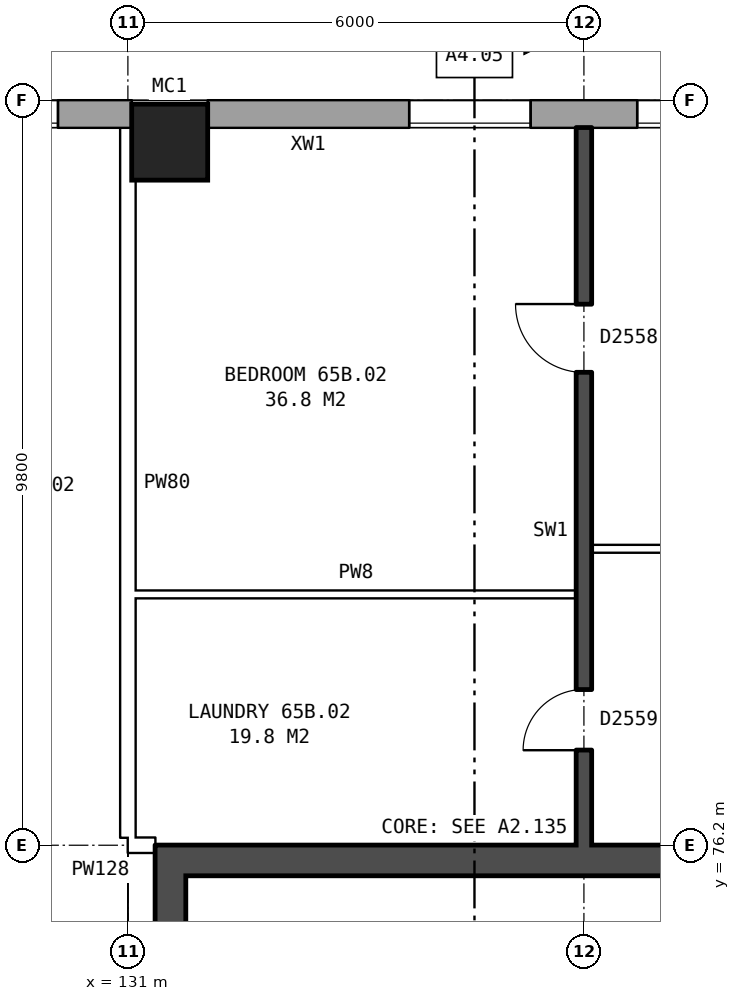
"""IFC4 building model, lengths in metres.
Left out: names, types, materials, properties, quantities, classifications, styles, units other than length and angle.
Written with IfcOpenShell. Run it as: python <this file> out.ifc"""

import sys

from ifc_helpers import new_model, si_unit, direction, frame, frame_2d, origin, origin_2d, place, context, subcontext, project, spatial, rectangle, hollow_rectangle, extrude, element, fill, save


model = new_model("IFC4")
c1 = context("Model", 3, precision=1e-05, world=origin(), true_north=direction((0.0, 1.0)))
c2 = subcontext(c1, "Body", "Model", "MODEL_VIEW")
j1 = project(units=[si_unit("LENGTHUNIT", "METRE"), si_unit("PLANEANGLEUNIT", "RADIAN")], contexts=[c1])
p1 = place(None, origin())
s1 = spatial("IfcSite", under=j1, at=p1, CompositionType="ELEMENT")
p2 = place(p1, origin())
s2 = spatial("IfcBuilding", under=s1, at=p2, CompositionType="ELEMENT")
p3 = place(p2, frame((0.0, 0.0, 230.7)))
s3 = spatial("IfcBuildingStorey", under=s2, at=p3, CompositionType="ELEMENT", Elevation=230.7)
p4 = place(p3, frame((131.55, 85.45, 0.0), z_axis=(0.0, 0.0, 1.0), x_axis=(1.0, 0.0, 0.0)))
e1 = element("IfcColumn", 1, at=p4, inside=s3, PredefinedType="COLUMN", context=c2, shape_type="SweptSolid", body=[
    extrude(hollow_rectangle(XDim=1.0, YDim=1.0, WallThickness=0.055, at=origin_2d()), origin(), (0.0, 0.0, 1.0), 3.1),
])
p5 = place(p3, frame((165.925, 85.82, 0.0), z_axis=(0.0, 0.0, 1.0), x_axis=(-1.0, 0.0, 0.0)))
e2 = element("IfcWall", 2, at=p5, inside=s3, PredefinedType="STANDARD", context=c2, shape_type="SweptSolid", body=[
    extrude(rectangle(XDim=33.875, YDim=0.36, at=frame_2d((16.938, 0.0))), origin(), (0.0, 0.0, 1.0), 2.85),
])
p6 = place(p5, frame((2.625, 0.0, 0.8)))
e3 = element("IfcOpeningElement", 3, at=p6, cuts=e2, PredefinedType="OPENING", context=c2, shape_type="SweptSolid", body=[
    extrude(rectangle(XDim=1.6, YDim=1.8, at=frame_2d((0.8, 0.9))), frame((0.0, 0.19, 0.0), z_axis=(0.0, -1.0, 0.0), x_axis=(1.0, 0.0, 0.0)), (0.0, 0.0, 1.0), 0.38),
])
p7 = place(p5, frame((5.625, 0.0, 0.8)))
e4 = element("IfcOpeningElement", 4, at=p7, cuts=e2, PredefinedType="OPENING", context=c2, shape_type="SweptSolid", body=[
    extrude(rectangle(XDim=1.6, YDim=1.8, at=frame_2d((0.8, 0.9))), frame((0.0, 0.19, 0.0), z_axis=(0.0, -1.0, 0.0), x_axis=(1.0, 0.0, 0.0)), (0.0, 0.0, 1.0), 0.38),
])
p8 = place(p5, frame((8.625, 0.0, 0.8)))
e5 = element("IfcOpeningElement", 5, at=p8, cuts=e2, PredefinedType="OPENING", context=c2, shape_type="SweptSolid", body=[
    extrude(rectangle(XDim=1.6, YDim=1.8, at=frame_2d((0.8, 0.9))), frame((0.0, 0.19, 0.0), z_axis=(0.0, -1.0, 0.0), x_axis=(1.0, 0.0, 0.0)), (0.0, 0.0, 1.0), 0.38),
])
p9 = place(p5, frame((11.125, 0.0, 0.8)))
e6 = element("IfcOpeningElement", 6, at=p9, cuts=e2, PredefinedType="OPENING", context=c2, shape_type="SweptSolid", body=[
    extrude(rectangle(XDim=1.4, YDim=1.8, at=frame_2d((0.7, 0.9))), frame((0.0, 0.19, 0.0), z_axis=(0.0, -1.0, 0.0), x_axis=(1.0, 0.0, 0.0)), (0.0, 0.0, 1.0), 0.38),
])
p10 = place(p5, frame((14.625, 0.0, 0.8)))
e7 = element("IfcOpeningElement", 7, at=p10, cuts=e2, PredefinedType="OPENING", context=c2, shape_type="SweptSolid", body=[
    extrude(rectangle(XDim=1.6, YDim=1.8, at=frame_2d((0.8, 0.9))), frame((0.0, 0.19, 0.0), z_axis=(0.0, -1.0, 0.0), x_axis=(1.0, 0.0, 0.0)), (0.0, 0.0, 1.0), 0.38),
])
p11 = place(p5, frame((17.125, 0.0, 0.25)))
e8 = element("IfcOpeningElement", 8, at=p11, cuts=e2, PredefinedType="OPENING", context=c2, shape_type="SweptSolid", body=[
    extrude(rectangle(XDim=0.6, YDim=1.2, at=frame_2d((0.3, 0.6))), frame((0.0, 0.19, 0.0), z_axis=(0.0, -1.0, 0.0), x_axis=(1.0, 0.0, 0.0)), (0.0, 0.0, 1.0), 0.38),
])
p12 = place(p5, frame((20.625, 0.0, 0.8)))
e9 = element("IfcOpeningElement", 9, at=p12, cuts=e2, PredefinedType="OPENING", context=c2, shape_type="SweptSolid", body=[
    extrude(rectangle(XDim=1.6, YDim=1.8, at=frame_2d((0.8, 0.9))), frame((0.0, 0.19, 0.0), z_axis=(0.0, -1.0, 0.0), x_axis=(1.0, 0.0, 0.0)), (0.0, 0.0, 1.0), 0.38),
])
p13 = place(p5, frame((23.625, 0.0, 0.8)))
e10 = element("IfcOpeningElement", 10, at=p13, cuts=e2, PredefinedType="OPENING", context=c2, shape_type="SweptSolid", body=[
    extrude(rectangle(XDim=1.6, YDim=1.8, at=frame_2d((0.8, 0.9))), frame((0.0, 0.19, 0.0), z_axis=(0.0, -1.0, 0.0), x_axis=(1.0, 0.0, 0.0)), (0.0, 0.0, 1.0), 0.38),
])
p14 = place(p5, frame((26.625, 0.0, 0.8)))
e11 = element("IfcOpeningElement", 11, at=p14, cuts=e2, PredefinedType="OPENING", context=c2, shape_type="SweptSolid", body=[
    extrude(rectangle(XDim=1.6, YDim=1.8, at=frame_2d((0.8, 0.9))), frame((0.0, 0.19, 0.0), z_axis=(0.0, -1.0, 0.0), x_axis=(1.0, 0.0, 0.0)), (0.0, 0.0, 1.0), 0.38),
])
p15 = place(p5, frame((29.625, 0.0, 0.8)))
e12 = element("IfcOpeningElement", 12, at=p15, cuts=e2, PredefinedType="OPENING", context=c2, shape_type="SweptSolid", body=[
    extrude(rectangle(XDim=1.6, YDim=1.8, at=frame_2d((0.8, 0.9))), frame((0.0, 0.19, 0.0), z_axis=(0.0, -1.0, 0.0), x_axis=(1.0, 0.0, 0.0)), (0.0, 0.0, 1.0), 0.38),
])
p16 = place(p5, frame((18.925, 0.0, 1.35)))
e13 = element("IfcOpeningElement", 13, at=p16, cuts=e2, PredefinedType="OPENING", context=c2, shape_type="SweptSolid", body=[
    extrude(rectangle(XDim=0.8, YDim=1.2, at=frame_2d((0.4, 0.6))), frame((0.0, 0.19, 0.0), z_axis=(0.0, -1.0, 0.0), x_axis=(1.0, 0.0, 0.0)), (0.0, 0.0, 1.0), 0.38),
])
p17 = place(p3, frame((131.05, 85.82, 0.0), z_axis=(0.0, 0.0, 1.0), x_axis=(-1.0, 0.0, 0.0)))
e14 = element("IfcWall", 14, at=p17, inside=s3, PredefinedType="STANDARD", context=c2, shape_type="SweptSolid", body=[
    extrude(rectangle(XDim=55.1, YDim=0.36, at=frame_2d((27.55, 0.0))), origin(), (0.0, 0.0, 1.0), 2.85),
])
p18 = place(p17, frame((0.969, 0.0, 0.8)))
e15 = element("IfcOpeningElement", 15, at=p18, cuts=e14, PredefinedType="OPENING", context=c2, shape_type="SweptSolid", body=[
    extrude(rectangle(XDim=1.6, YDim=1.8, at=frame_2d((0.8, 0.9))), frame((0.0, 0.19, 0.0), z_axis=(0.0, -1.0, 0.0), x_axis=(1.0, 0.0, 0.0)), (0.0, 0.0, 1.0), 0.38),
])
p19 = place(p17, frame((4.406, 0.0, 0.8)))
e16 = element("IfcOpeningElement", 16, at=p19, cuts=e14, PredefinedType="OPENING", context=c2, shape_type="SweptSolid", body=[
    extrude(rectangle(XDim=1.6, YDim=1.8, at=frame_2d((0.8, 0.9))), frame((0.0, 0.19, 0.0), z_axis=(0.0, -1.0, 0.0), x_axis=(1.0, 0.0, 0.0)), (0.0, 0.0, 1.0), 0.38),
])
p20 = place(p17, frame((7.844, 0.0, 0.8)))
e17 = element("IfcOpeningElement", 17, at=p20, cuts=e14, PredefinedType="OPENING", context=c2, shape_type="SweptSolid", body=[
    extrude(rectangle(XDim=1.6, YDim=1.8, at=frame_2d((0.8, 0.9))), frame((0.0, 0.19, 0.0), z_axis=(0.0, -1.0, 0.0), x_axis=(1.0, 0.0, 0.0)), (0.0, 0.0, 1.0), 0.38),
])
p21 = place(p17, frame((11.281, 0.0, 0.8)))
e18 = element("IfcOpeningElement", 18, at=p21, cuts=e14, PredefinedType="OPENING", context=c2, shape_type="SweptSolid", body=[
    extrude(rectangle(XDim=1.6, YDim=1.8, at=frame_2d((0.8, 0.9))), frame((0.0, 0.19, 0.0), z_axis=(0.0, -1.0, 0.0), x_axis=(1.0, 0.0, 0.0)), (0.0, 0.0, 1.0), 0.38),
])
p22 = place(p17, frame((14.719, 0.0, 0.8)))
e19 = element("IfcOpeningElement", 19, at=p22, cuts=e14, PredefinedType="OPENING", context=c2, shape_type="SweptSolid", body=[
    extrude(rectangle(XDim=1.6, YDim=1.8, at=frame_2d((0.8, 0.9))), frame((0.0, 0.19, 0.0), z_axis=(0.0, -1.0, 0.0), x_axis=(1.0, 0.0, 0.0)), (0.0, 0.0, 1.0), 0.38),
])
p23 = place(p17, frame((18.156, 0.0, 0.8)))
e20 = element("IfcOpeningElement", 20, at=p23, cuts=e14, PredefinedType="OPENING", context=c2, shape_type="SweptSolid", body=[
    extrude(rectangle(XDim=1.6, YDim=1.8, at=frame_2d((0.8, 0.9))), frame((0.0, 0.19, 0.0), z_axis=(0.0, -1.0, 0.0), x_axis=(1.0, 0.0, 0.0)), (0.0, 0.0, 1.0), 0.38),
])
p24 = place(p17, frame((21.594, 0.0, 0.8)))
e21 = element("IfcOpeningElement", 21, at=p24, cuts=e14, PredefinedType="OPENING", context=c2, shape_type="SweptSolid", body=[
    extrude(rectangle(XDim=1.6, YDim=1.8, at=frame_2d((0.8, 0.9))), frame((0.0, 0.19, 0.0), z_axis=(0.0, -1.0, 0.0), x_axis=(1.0, 0.0, 0.0)), (0.0, 0.0, 1.0), 0.38),
])
p25 = place(p17, frame((25.031, 0.0, 0.8)))
e22 = element("IfcOpeningElement", 22, at=p25, cuts=e14, PredefinedType="OPENING", context=c2, shape_type="SweptSolid", body=[
    extrude(rectangle(XDim=1.6, YDim=1.8, at=frame_2d((0.8, 0.9))), frame((0.0, 0.19, 0.0), z_axis=(0.0, -1.0, 0.0), x_axis=(1.0, 0.0, 0.0)), (0.0, 0.0, 1.0), 0.38),
])
p26 = place(p17, frame((28.469, 0.0, 0.8)))
e23 = element("IfcOpeningElement", 23, at=p26, cuts=e14, PredefinedType="OPENING", context=c2, shape_type="SweptSolid", body=[
    extrude(rectangle(XDim=1.6, YDim=1.8, at=frame_2d((0.8, 0.9))), frame((0.0, 0.19, 0.0), z_axis=(0.0, -1.0, 0.0), x_axis=(1.0, 0.0, 0.0)), (0.0, 0.0, 1.0), 0.38),
])
p27 = place(p17, frame((31.906, 0.0, 0.8)))
e24 = element("IfcOpeningElement", 24, at=p27, cuts=e14, PredefinedType="OPENING", context=c2, shape_type="SweptSolid", body=[
    extrude(rectangle(XDim=1.6, YDim=1.8, at=frame_2d((0.8, 0.9))), frame((0.0, 0.19, 0.0), z_axis=(0.0, -1.0, 0.0), x_axis=(1.0, 0.0, 0.0)), (0.0, 0.0, 1.0), 0.38),
])
p28 = place(p17, frame((35.344, 0.0, 0.8)))
e25 = element("IfcOpeningElement", 25, at=p28, cuts=e14, PredefinedType="OPENING", context=c2, shape_type="SweptSolid", body=[
    extrude(rectangle(XDim=1.6, YDim=1.8, at=frame_2d((0.8, 0.9))), frame((0.0, 0.19, 0.0), z_axis=(0.0, -1.0, 0.0), x_axis=(1.0, 0.0, 0.0)), (0.0, 0.0, 1.0), 0.38),
])
p29 = place(p17, frame((38.781, 0.0, 0.8)))
e26 = element("IfcOpeningElement", 26, at=p29, cuts=e14, PredefinedType="OPENING", context=c2, shape_type="SweptSolid", body=[
    extrude(rectangle(XDim=1.6, YDim=1.8, at=frame_2d((0.8, 0.9))), frame((0.0, 0.19, 0.0), z_axis=(0.0, -1.0, 0.0), x_axis=(1.0, 0.0, 0.0)), (0.0, 0.0, 1.0), 0.38),
])
p30 = place(p17, frame((42.219, 0.0, 0.8)))
e27 = element("IfcOpeningElement", 27, at=p30, cuts=e14, PredefinedType="OPENING", context=c2, shape_type="SweptSolid", body=[
    extrude(rectangle(XDim=1.6, YDim=1.8, at=frame_2d((0.8, 0.9))), frame((0.0, 0.19, 0.0), z_axis=(0.0, -1.0, 0.0), x_axis=(1.0, 0.0, 0.0)), (0.0, 0.0, 1.0), 0.38),
])
p31 = place(p17, frame((45.656, 0.0, 0.8)))
e28 = element("IfcOpeningElement", 28, at=p31, cuts=e14, PredefinedType="OPENING", context=c2, shape_type="SweptSolid", body=[
    extrude(rectangle(XDim=1.6, YDim=1.8, at=frame_2d((0.8, 0.9))), frame((0.0, 0.19, 0.0), z_axis=(0.0, -1.0, 0.0), x_axis=(1.0, 0.0, 0.0)), (0.0, 0.0, 1.0), 0.38),
])
p32 = place(p17, frame((49.094, 0.0, 0.8)))
e29 = element("IfcOpeningElement", 29, at=p32, cuts=e14, PredefinedType="OPENING", context=c2, shape_type="SweptSolid", body=[
    extrude(rectangle(XDim=1.6, YDim=1.8, at=frame_2d((0.8, 0.9))), frame((0.0, 0.19, 0.0), z_axis=(0.0, -1.0, 0.0), x_axis=(1.0, 0.0, 0.0)), (0.0, 0.0, 1.0), 0.38),
])
p33 = place(p17, frame((52.531, 0.0, 0.8)))
e30 = element("IfcOpeningElement", 30, at=p33, cuts=e14, PredefinedType="OPENING", context=c2, shape_type="SweptSolid", body=[
    extrude(rectangle(XDim=1.6, YDim=1.8, at=frame_2d((0.8, 0.9))), frame((0.0, 0.19, 0.0), z_axis=(0.0, -1.0, 0.0), x_axis=(1.0, 0.0, 0.0)), (0.0, 0.0, 1.0), 0.38),
])
p34 = place(p3, frame((131.56, 63.8, 0.0), z_axis=(0.0, 0.0, 1.0), x_axis=(0.0, 1.0, 0.0)))
e31 = element("IfcWall", 31, at=p34, inside=s3, PredefinedType="SHEAR", context=c2, shape_type="SweptSolid", body=[
    extrude(rectangle(XDim=12.4, YDim=0.4, at=frame_2d((6.2, 0.0))), origin(), (0.0, 0.0, 1.0), 2.85),
])
p35 = place(p34, frame((9.8, 0.0, 0.0)))
e32 = element("IfcOpeningElement", 32, at=p35, cuts=e31, PredefinedType="OPENING", context=c2, shape_type="SweptSolid", body=[
    extrude(rectangle(XDim=1.1, YDim=2.1, at=frame_2d((0.55, 1.05))), frame((0.0, 0.21, 0.0), z_axis=(0.0, -1.0, 0.0), x_axis=(1.0, 0.0, 0.0)), (0.0, 0.0, 1.0), 0.42),
])
p36 = place(p3, frame((139.36, 76.0, 0.0), z_axis=(0.0, 0.0, 1.0), x_axis=(-1.0, 0.0, 0.0)))
e33 = element("IfcWall", 33, at=p36, inside=s3, PredefinedType="SHEAR", context=c2, shape_type="SweptSolid", body=[
    extrude(rectangle(XDim=7.6, YDim=0.4, at=frame_2d((3.8, 0.0))), origin(), (0.0, 0.0, 1.0), 2.85),
])
p37 = place(p3, frame((131.0, 76.2, 0.0), z_axis=(0.0, 0.0, 1.0), x_axis=(1.0, 0.0, 0.0)))
e34 = element("IfcWall", 34, at=p37, inside=s3, PredefinedType="PARTITIONING", context=c2, shape_type="SweptSolid", body=[
    extrude(rectangle(XDim=0.36, YDim=0.2, at=frame_2d((0.18, 0.0))), origin(), (0.0, 0.0, 1.0), 2.85),
])
p38 = place(p3, frame((131.1, 79.5, 0.0), z_axis=(0.0, 0.0, 1.0), x_axis=(1.0, 0.0, 0.0)))
e35 = element("IfcWall", 35, at=p38, inside=s3, PredefinedType="PARTITIONING", context=c2, shape_type="SweptSolid", body=[
    extrude(rectangle(XDim=5.8, YDim=0.1, at=frame_2d((2.9, 0.0))), origin(), (0.0, 0.0, 1.0), 2.85),
])
p39 = place(p3, frame((137.1, 80.1, 0.0), z_axis=(0.0, 0.0, 1.0), x_axis=(1.0, 0.0, 0.0)))
e36 = element("IfcWall", 36, at=p39, inside=s3, PredefinedType="PARTITIONING", context=c2, shape_type="SweptSolid", body=[
    extrude(rectangle(XDim=5.8, YDim=0.1, at=frame_2d((2.9, 0.0))), origin(), (0.0, 0.0, 1.0), 2.85),
])
p40 = place(p39, frame((1.3, 0.0, 0.0)))
e37 = element("IfcOpeningElement", 37, at=p40, cuts=e36, PredefinedType="OPENING", context=c2, shape_type="SweptSolid", body=[
    extrude(rectangle(XDim=0.9, YDim=2.1, at=frame_2d((0.45, 1.05))), frame((0.0, 0.06, 0.0), z_axis=(0.0, -1.0, 0.0), x_axis=(1.0, 0.0, 0.0)), (0.0, 0.0, 1.0), 0.12),
])
p41 = place(p39, frame((4.2, 0.0, 0.0)))
e38 = element("IfcOpeningElement", 38, at=p41, cuts=e36, PredefinedType="OPENING", context=c2, shape_type="SweptSolid", body=[
    extrude(rectangle(XDim=0.9, YDim=2.1, at=frame_2d((0.45, 1.05))), frame((0.0, 0.06, 0.0), z_axis=(0.0, -1.0, 0.0), x_axis=(1.0, 0.0, 0.0)), (0.0, 0.0, 1.0), 0.12),
])
p42 = place(p3, frame((131.0, 76.3, 0.0), z_axis=(0.0, 0.0, 1.0), x_axis=(0.0, 1.0, 0.0)))
e39 = element("IfcWall", 39, at=p42, inside=s3, PredefinedType="PARTITIONING", context=c2, shape_type="SweptSolid", body=[
    extrude(rectangle(XDim=9.34, YDim=0.2, at=frame_2d((4.67, 0.0))), origin(), (0.0, 0.0, 1.0), 2.85),
])
p43 = place(p3, frame((137.0, 76.2, 0.0), z_axis=(0.0, 0.0, 1.0), x_axis=(0.0, 1.0, 0.0)))
e40 = element("IfcWall", 40, at=p43, inside=s3, PredefinedType="SOLIDWALL", context=c2, shape_type="SweptSolid", body=[
    extrude(rectangle(XDim=9.44, YDim=0.2, at=frame_2d((4.72, 0.0))), origin(), (0.0, 0.0, 1.0), 2.85),
])
p44 = place(p43, frame((6.22, 0.0, 0.0)))
e41 = element("IfcOpeningElement", 41, at=p44, cuts=e40, PredefinedType="OPENING", context=c2, shape_type="SweptSolid", body=[
    extrude(rectangle(XDim=0.9, YDim=2.1, at=frame_2d((0.45, 1.05))), frame((0.0, 0.11, 0.0), z_axis=(0.0, -1.0, 0.0), x_axis=(1.0, 0.0, 0.0)), (0.0, 0.0, 1.0), 0.22),
])
p45 = place(p43, frame((1.25, 0.0, 0.0)))
e42 = element("IfcOpeningElement", 42, at=p45, cuts=e40, PredefinedType="OPENING", context=c2, shape_type="SweptSolid", body=[
    extrude(rectangle(XDim=0.8, YDim=2.1, at=frame_2d((0.4, 1.05))), frame((0.0, 0.11, 0.0), z_axis=(0.0, -1.0, 0.0), x_axis=(1.0, 0.0, 0.0)), (0.0, 0.0, 1.0), 0.22),
])
p46 = place(p14, origin())
e43 = element("IfcWindow", 43, at=p46, inside=s3, PartitioningType="SINGLE_PANEL", PredefinedType="WINDOW", context=c2, shape_type="SweptSolid", body=[
    extrude(rectangle(XDim=1.6, YDim=1.8, at=frame_2d((0.8, 0.9))), frame((0.0, 0.15, 0.0), z_axis=(0.0, -1.0, 0.0), x_axis=(1.0, 0.0, 0.0)), (0.0, 0.0, 1.0), 0.06),
])
fill(e11, e43)
p47 = place(p15, origin())
e44 = element("IfcWindow", 44, at=p47, inside=s3, PartitioningType="SINGLE_PANEL", PredefinedType="WINDOW", context=c2, shape_type="SweptSolid", body=[
    extrude(rectangle(XDim=1.6, YDim=1.8, at=frame_2d((0.8, 0.9))), frame((0.0, 0.15, 0.0), z_axis=(0.0, -1.0, 0.0), x_axis=(1.0, 0.0, 0.0)), (0.0, 0.0, 1.0), 0.06),
])
fill(e12, e44)
p48 = place(p18, origin())
e45 = element("IfcWindow", 45, at=p48, inside=s3, PartitioningType="SINGLE_PANEL", PredefinedType="WINDOW", context=c2, shape_type="SweptSolid", body=[
    extrude(rectangle(XDim=1.6, YDim=1.8, at=frame_2d((0.8, 0.9))), frame((0.0, 0.15, 0.0), z_axis=(0.0, -1.0, 0.0), x_axis=(1.0, 0.0, 0.0)), (0.0, 0.0, 1.0), 0.06),
])
fill(e15, e45)
p49 = place(p44, origin())
e46 = element("IfcDoor", 46, at=p49, inside=s3, OperationType="SINGLE_SWING_RIGHT", PredefinedType="DOOR", context=c2, shape_type="SweptSolid", body=[
    extrude(rectangle(XDim=0.9, YDim=2.1, at=frame_2d((0.45, 1.05))), frame((0.0, 0.025, 0.0), z_axis=(0.0, -1.0, 0.0), x_axis=(1.0, 0.0, 0.0)), (0.0, 0.0, 1.0), 0.05),
])
fill(e41, e46)
p50 = place(p45, origin())
e47 = element("IfcDoor", 47, at=p50, inside=s3, OperationType="SINGLE_SWING_LEFT", PredefinedType="DOOR", context=c2, shape_type="SweptSolid", body=[
    extrude(rectangle(XDim=0.8, YDim=2.1, at=frame_2d((0.4, 1.05))), frame((0.0, 0.025, 0.0), z_axis=(0.0, -1.0, 0.0), x_axis=(1.0, 0.0, 0.0)), (0.0, 0.0, 1.0), 0.05),
])
fill(e42, e47)
save(model, sys.argv[1])
